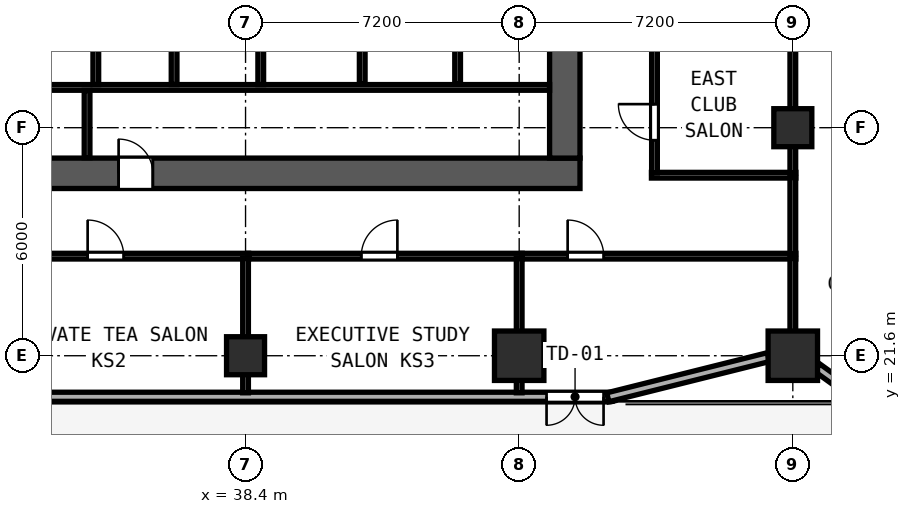
"""IFC4 building model, lengths in metres.
Left out: names, types, materials, properties, quantities, classifications, styles, units other than length and angle.
Written with IfcOpenShell. Run it as: python <this file> out.ifc"""

import sys

from ifc_helpers import new_model, si_unit, direction, frame, frame_2d, origin, origin_2d, place, context, subcontext, project, spatial, rectangle, hollow_rectangle, extrude, element, fill, save


model = new_model("IFC4")
c1 = context("Model", 3, precision=1e-05, world=origin(), true_north=direction((0.0, 1.0)))
c2 = subcontext(c1, "Body", "Model", "MODEL_VIEW")
j1 = project(units=[si_unit("LENGTHUNIT", "METRE"), si_unit("PLANEANGLEUNIT", "RADIAN")], contexts=[c1])
p1 = place(None, origin())
s1 = spatial("IfcSite", under=j1, at=p1, CompositionType="ELEMENT")
p2 = place(p1, origin())
s2 = spatial("IfcBuilding", under=s1, at=p2, CompositionType="ELEMENT")
p3 = place(p2, frame((0.0, 0.0, 24.0)))
s3 = spatial("IfcBuildingStorey", under=s2, at=p3, CompositionType="ELEMENT", Elevation=24.0)
p4 = place(p3, frame((29.6, 26.4, 0.0), z_axis=(0.0, 0.0, 1.0), x_axis=(1.0, 0.0, 0.0)))
e1 = element("IfcWall", 1, at=p4, inside=s3, PredefinedType="SHEAR", context=c2, shape_type="SweptSolid", body=[
    extrude(rectangle(XDim=17.6, YDim=0.8, at=frame_2d((8.8, 0.0))), origin(), (0.0, 0.0, 1.0), 3.6),
])
p5 = place(p4, frame((2.47, 0.0, 0.0), z_axis=(0.0, 0.0, 1.0), x_axis=(-1.0, 0.0, 0.0)))
e2 = element("IfcOpeningElement", 2, at=p5, cuts=e1, PredefinedType="OPENING", context=c2, shape_type="SweptSolid", body=[
    extrude(rectangle(XDim=0.9, YDim=2.1, at=frame_2d((0.45, 1.05))), frame((0.0, 0.41, 0.0), z_axis=(0.0, -1.0, 0.0), x_axis=(1.0, 0.0, 0.0)), (0.0, 0.0, 1.0), 0.82),
])
p6 = place(p4, frame((6.36, 0.0, 0.0), z_axis=(0.0, 0.0, 1.0), x_axis=(-1.0, 0.0, 0.0)))
e3 = element("IfcOpeningElement", 3, at=p6, cuts=e1, PredefinedType="OPENING", context=c2, shape_type="SweptSolid", body=[
    extrude(rectangle(XDim=0.9, YDim=2.1, at=frame_2d((0.45, 1.05))), frame((0.0, 0.41, 0.0), z_axis=(0.0, -1.0, 0.0), x_axis=(1.0, 0.0, 0.0)), (0.0, 0.0, 1.0), 0.82),
])
p7 = place(p3, frame((46.8, 26.8, 0.0), z_axis=(0.0, 0.0, 1.0), x_axis=(0.0, 1.0, 0.0)))
e4 = element("IfcWall", 4, at=p7, inside=s3, PredefinedType="SHEAR", context=c2, shape_type="SweptSolid", body=[
    extrude(rectangle(XDim=4.05, YDim=0.8, at=frame_2d((2.025, 0.0))), origin(), (0.0, 0.0, 1.0), 3.6),
])
for number, where, z_axis, x_axis in (
    (5, (52.8, 21.6, 0.0), (0.0, 0.0, 1.0), (1.0, 0.0, 0.0)),
    (6, (45.6, 21.6, 0.0), (0.0, 0.0, 1.0), (1.0, 0.0, 0.0)),
):
    element("IfcColumn", number, at=place(p3, frame(where, z_axis=z_axis, x_axis=x_axis)), inside=s3, PredefinedType="COLUMN", context=c2, shape_type="SweptSolid", body=[
        extrude(hollow_rectangle(XDim=1.3, YDim=1.3, WallThickness=0.048, at=origin_2d()), origin(), (0.0, 0.0, 1.0), 3.8),
    ])
for number, where, z_axis, x_axis in (
    (7, (52.8, 27.6, -0.26), (0.0, 0.0, 1.0), (1.0, 0.0, 0.0)),
    (8, (38.4, 21.6, -0.26), (0.0, 0.0, 1.0), (1.0, 0.0, 0.0)),
):
    element("IfcColumn", number, at=place(p3, frame(where, z_axis=z_axis, x_axis=x_axis)), inside=s3, PredefinedType="COLUMN", context=c2, shape_type="SweptSolid", body=[
        extrude(hollow_rectangle(XDim=1.0, YDim=1.0, WallThickness=0.038, at=origin_2d()), origin(), (0.0, 0.0, 1.0), 4.06),
    ])
p8 = place(p3, frame((28.76, 20.52, 0.0), z_axis=(0.0, 0.0, 1.0), x_axis=(1.0, 0.0, 0.0)))
e9 = element("IfcWall", 9, at=p8, inside=s3, PredefinedType="SOLIDWALL", context=c2, shape_type="SweptSolid", body=[
    extrude(rectangle(XDim=19.281, YDim=0.24, at=frame_2d((9.64, 0.0))), origin(), (0.0, 0.0, 1.0), 3.6),
])
p9 = place(p8, frame((19.06, 0.0, 0.0), z_axis=(0.0, 0.0, 1.0), x_axis=(-1.0, 0.0, 0.0)))
e10 = element("IfcOpeningElement", 10, at=p9, cuts=e9, PredefinedType="OPENING", context=c2, shape_type="SweptSolid", body=[
    extrude(rectangle(XDim=1.5, YDim=2.2, at=frame_2d((0.75, 1.1))), frame((0.0, 0.13, 0.0), z_axis=(0.0, -1.0, 0.0), x_axis=(1.0, 0.0, 0.0)), (0.0, 0.0, 1.0), 0.26),
])
p10 = place(p3, frame((47.932, 20.507, 0.0), z_axis=(0.0, 0.0, 1.0), x_axis=(0.970135906278, 0.242561998982, 0.0)))
e11 = element("IfcWall", 11, at=p10, inside=s3, PredefinedType="SOLIDWALL", context=c2, shape_type="SweptSolid", body=[
    extrude(rectangle(XDim=4.356, YDim=0.24, at=frame_2d((2.178, 0.0))), origin(), (0.0, 0.0, 1.0), 3.097),
])
p11 = place(p3, frame((53.442, 21.286, 0.0), z_axis=(0.0, 0.0, 1.0), x_axis=(0.811542842993, -0.584292917967, 0.0)))
e12 = element("IfcWall", 12, at=p11, inside=s3, PredefinedType="SOLIDWALL", context=c2, shape_type="SweptSolid", body=[
    extrude(rectangle(XDim=11.438, YDim=0.24, at=frame_2d((5.719, 0.0))), origin(), (0.0, 0.0, 1.0), 3.097),
])
p12 = place(p11, frame((1.6, 0.0, 0.85)))
e13 = element("IfcOpeningElement", 13, at=p12, cuts=e12, PredefinedType="OPENING", context=c2, shape_type="SweptSolid", body=[
    extrude(rectangle(XDim=1.2, YDim=1.85, at=frame_2d((0.6, 0.925))), frame((0.0, 0.13, 0.0), z_axis=(0.0, -1.0, 0.0), x_axis=(1.0, 0.0, 0.0)), (0.0, 0.0, 1.0), 0.26),
])
p13 = place(p11, frame((7.0, 0.0, 0.85)))
e14 = element("IfcOpeningElement", 14, at=p13, cuts=e12, PredefinedType="OPENING", context=c2, shape_type="SweptSolid", body=[
    extrude(rectangle(XDim=1.2, YDim=1.85, at=frame_2d((0.6, 0.925))), frame((0.0, 0.13, 0.0), z_axis=(0.0, -1.0, 0.0), x_axis=(1.0, 0.0, 0.0)), (0.0, 0.0, 1.0), 0.26),
])
p14 = place(p3, frame((30.4, 28.66, 0.0), z_axis=(0.0, 0.0, 1.0), x_axis=(1.0, 0.0, 0.0)))
e15 = element("IfcWall", 15, at=p14, inside=s3, PredefinedType="PARTITIONING", context=c2, shape_type="SweptSolid", body=[
    extrude(rectangle(XDim=16.0, YDim=0.15, at=frame_2d((8.0, 0.0))), origin(), (0.0, 0.0, 1.0), 3.6),
])
for number, where, z_axis, x_axis in (
    (16, (34.46, 28.735, 0.0), (0.0, 0.0, 1.0), (0.0, 1.0, 0.0)),
    (17, (36.52, 28.735, 0.0), (0.0, 0.0, 1.0), (0.0, 1.0, 0.0)),
    (18, (38.8, 28.735, 0.0), (0.0, 0.0, 1.0), (0.0, 1.0, 0.0)),
):
    element("IfcWall", number, at=place(p3, frame(where, z_axis=z_axis, x_axis=x_axis)), inside=s3, PredefinedType="SOLIDWALL", context=c2, shape_type="SweptSolid", body=[
        extrude(rectangle(XDim=1.985, YDim=0.15, at=frame_2d((0.992, 0.0))), origin(), (0.0, 0.0, 1.0), 3.6),
    ])
p15 = place(p3, frame((34.23, 26.81, 0.0), z_axis=(0.0, 0.0, 1.0), x_axis=(0.0, 1.0, 0.0)))
e19 = element("IfcWall", 19, at=p15, inside=s3, PredefinedType="PARTITIONING", context=c2, shape_type="SweptSolid", body=[
    extrude(rectangle(XDim=1.77, YDim=0.15, at=frame_2d((0.885, 0.0))), origin(), (0.0, 0.0, 1.0), 3.6),
])
for number, where, z_axis, x_axis in (
    (20, (41.47, 28.75, 0.0), (0.0, 0.0, 1.0), (0.0, 1.0, 0.0)),
    (21, (43.98, 28.75, 0.0), (0.0, 0.0, 1.0), (0.0, 1.0, 0.0)),
):
    element("IfcWall", number, at=place(p3, frame(where, z_axis=z_axis, x_axis=x_axis)), inside=s3, PredefinedType="SOLIDWALL", context=c2, shape_type="SweptSolid", body=[
        extrude(rectangle(XDim=1.985, YDim=0.15, at=frame_2d((0.993, 0.0))), origin(), (0.0, 0.0, 1.0), 3.6),
    ])
p16 = place(p3, frame((49.08, 26.35, 0.0), z_axis=(0.0, 0.0, 1.0), x_axis=(1.0, 0.0, 0.0)))
e22 = element("IfcWall", 22, at=p16, inside=s3, PredefinedType="PARTITIONING", context=c2, shape_type="SweptSolid", body=[
    extrude(rectangle(XDim=3.8, YDim=0.15, at=frame_2d((1.9, 0.0))), origin(), (0.0, 0.0, 1.0), 3.6),
])
p17 = place(p3, frame((49.16, 26.41, 0.0), z_axis=(0.0, 0.0, 1.0), x_axis=(0.0, 1.0, 0.0)))
e23 = element("IfcWall", 23, at=p17, inside=s3, PredefinedType="PARTITIONING", context=c2, shape_type="SweptSolid", body=[
    extrude(rectangle(XDim=3.51, YDim=0.15, at=frame_2d((1.755, 0.0))), origin(), (0.0, 0.0, 1.0), 3.6),
])
p18 = place(p17, frame((0.86, 0.0, 0.0)))
e24 = element("IfcOpeningElement", 24, at=p18, cuts=e23, PredefinedType="OPENING", context=c2, shape_type="SweptSolid", body=[
    extrude(rectangle(XDim=0.95, YDim=2.12, at=frame_2d((0.475, 1.06))), frame((0.0, 0.085, 0.0), z_axis=(0.0, -1.0, 0.0), x_axis=(1.0, 0.0, 0.0)), (0.0, 0.0, 1.0), 0.17),
])
p19 = place(p3, frame((52.8, 26.41, 0.0), z_axis=(0.0, 0.0, 1.0), x_axis=(0.0, 1.0, 0.0)))
e25 = element("IfcWall", 25, at=p19, inside=s3, PredefinedType="PARTITIONING", context=c2, shape_type="SweptSolid", body=[
    extrude(rectangle(XDim=3.51, YDim=0.15, at=frame_2d((1.755, 0.0))), origin(), (0.0, 0.0, 1.0), 3.097),
])
p20 = place(p3, frame((31.282, 24.22, 0.0), z_axis=(0.0, 0.0, 1.0), x_axis=(1.0, 0.0, 0.0)))
e26 = element("IfcWall", 26, at=p20, inside=s3, PredefinedType="PARTITIONING", context=c2, shape_type="SweptSolid", body=[
    extrude(rectangle(XDim=7.198, YDim=0.15, at=frame_2d((3.599, 0.0))), origin(), (0.0, 0.0, 1.0), 3.6),
])
p21 = place(p20, frame((3.913, 0.0, 0.0), z_axis=(0.0, 0.0, 1.0), x_axis=(-1.0, 0.0, 0.0)))
e27 = element("IfcOpeningElement", 27, at=p21, cuts=e26, PredefinedType="OPENING", context=c2, shape_type="SweptSolid", body=[
    extrude(rectangle(XDim=0.95, YDim=2.12, at=frame_2d((0.475, 1.06))), frame((0.0, 0.085, 0.0), z_axis=(0.0, -1.0, 0.0), x_axis=(1.0, 0.0, 0.0)), (0.0, 0.0, 1.0), 0.17),
])
p22 = place(p3, frame((38.4, 20.625, 0.0), z_axis=(0.0, 0.0, 1.0), x_axis=(0.0, 1.0, 0.0)))
e28 = element("IfcWall", 28, at=p22, inside=s3, PredefinedType="PARTITIONING", context=c2, shape_type="SweptSolid", body=[
    extrude(rectangle(XDim=3.535, YDim=0.15, at=frame_2d((1.768, 0.0))), origin(), (0.0, 0.0, 1.0), 2.985),
])
p23 = place(p3, frame((38.482, 24.22, 0.0), z_axis=(0.0, 0.0, 1.0), x_axis=(1.0, 0.0, 0.0)))
e29 = element("IfcWall", 29, at=p23, inside=s3, PredefinedType="PARTITIONING", context=c2, shape_type="SweptSolid", body=[
    extrude(rectangle(XDim=7.198, YDim=0.15, at=frame_2d((3.599, 0.0))), origin(), (0.0, 0.0, 1.0), 3.6),
])
p24 = place(p23, frame((3.913, 0.0, 0.0), z_axis=(0.0, 0.0, 1.0), x_axis=(-1.0, 0.0, 0.0)))
e30 = element("IfcOpeningElement", 30, at=p24, cuts=e29, PredefinedType="OPENING", context=c2, shape_type="SweptSolid", body=[
    extrude(rectangle(XDim=0.95, YDim=2.12, at=frame_2d((0.475, 1.06))), frame((0.0, 0.085, 0.0), z_axis=(0.0, -1.0, 0.0), x_axis=(1.0, 0.0, 0.0)), (0.0, 0.0, 1.0), 0.17),
])
p25 = place(p3, frame((45.6, 20.625, 0.0), z_axis=(0.0, 0.0, 1.0), x_axis=(0.0, 1.0, 0.0)))
e31 = element("IfcWall", 31, at=p25, inside=s3, PredefinedType="PARTITIONING", context=c2, shape_type="SweptSolid", body=[
    extrude(rectangle(XDim=3.535, YDim=0.15, at=frame_2d((1.768, 0.0))), origin(), (0.0, 0.0, 1.0), 2.985),
])
p26 = place(p3, frame((45.682, 24.22, 0.0), z_axis=(0.0, 0.0, 1.0), x_axis=(1.0, 0.0, 0.0)))
e32 = element("IfcWall", 32, at=p26, inside=s3, PredefinedType="PARTITIONING", context=c2, shape_type="SweptSolid", body=[
    extrude(rectangle(XDim=7.198, YDim=0.15, at=frame_2d((3.599, 0.0))), origin(), (0.0, 0.0, 1.0), 3.6),
])
p27 = place(p26, frame((2.143, 0.0, 0.0), z_axis=(0.0, 0.0, 1.0), x_axis=(-1.0, 0.0, 0.0)))
e33 = element("IfcOpeningElement", 33, at=p27, cuts=e32, PredefinedType="OPENING", context=c2, shape_type="SweptSolid", body=[
    extrude(rectangle(XDim=0.95, YDim=2.12, at=frame_2d((0.475, 1.06))), frame((0.0, 0.085, 0.0), z_axis=(0.0, -1.0, 0.0), x_axis=(1.0, 0.0, 0.0)), (0.0, 0.0, 1.0), 0.17),
])
p28 = place(p3, frame((52.8, 21.819, 0.0), z_axis=(0.0, 0.0, 1.0), x_axis=(0.0, 1.0, 0.0)))
e34 = element("IfcWall", 34, at=p28, inside=s3, PredefinedType="PARTITIONING", context=c2, shape_type="SweptSolid", body=[
    extrude(rectangle(XDim=2.341, YDim=0.15, at=frame_2d((1.171, 0.0))), origin(), (0.0, 0.0, 1.0), 3.097),
])
p29 = place(p3, frame((52.8, 24.28, 0.0), z_axis=(0.0, 0.0, 1.0), x_axis=(0.0, 1.0, 0.0)))
e35 = element("IfcWall", 35, at=p29, inside=s3, PredefinedType="PARTITIONING", context=c2, shape_type="SweptSolid", body=[
    extrude(rectangle(XDim=2.01, YDim=0.15, at=frame_2d((1.005, 0.0))), origin(), (0.0, 0.0, 1.0), 3.097),
])
p30 = place(p9, origin())
e36 = element("IfcDoor", 36, at=p30, inside=s3, OperationType="DOUBLE_DOOR_SINGLE_SWING", PredefinedType="DOOR", context=c2, shape_type="SweptSolid", body=[
    extrude(rectangle(XDim=1.5, YDim=2.2, at=frame_2d((0.75, 1.1))), frame((0.0, 0.025, 0.0), z_axis=(0.0, -1.0, 0.0), x_axis=(1.0, 0.0, 0.0)), (0.0, 0.0, 1.0), 0.05),
])
fill(e10, e36)
p31 = place(p6, origin())
e37 = element("IfcDoor", 37, at=p31, inside=s3, OperationType="SINGLE_SWING_RIGHT", PredefinedType="DOOR", context=c2, shape_type="SweptSolid", body=[
    extrude(rectangle(XDim=0.9, YDim=2.1, at=frame_2d((0.45, 1.05))), frame((0.0, -0.195, 0.0), z_axis=(0.0, -1.0, 0.0), x_axis=(1.0, 0.0, 0.0)), (0.0, 0.0, 1.0), 0.05),
])
fill(e3, e37)
p32 = place(p18, origin())
e38 = element("IfcDoor", 38, at=p32, inside=s3, OperationType="SINGLE_SWING_RIGHT", PredefinedType="DOOR", context=c2, shape_type="SweptSolid", body=[
    extrude(rectangle(XDim=0.95, YDim=2.12, at=frame_2d((0.475, 1.06))), frame((0.0, 0.025, 0.0), z_axis=(0.0, -1.0, 0.0), x_axis=(1.0, 0.0, 0.0)), (0.0, 0.0, 1.0), 0.05),
])
fill(e24, e38)
p33 = place(p21, origin())
e39 = element("IfcDoor", 39, at=p33, inside=s3, OperationType="SINGLE_SWING_RIGHT", PredefinedType="DOOR", context=c2, shape_type="SweptSolid", body=[
    extrude(rectangle(XDim=0.95, YDim=2.12, at=frame_2d((0.475, 1.06))), frame((0.0, 0.025, 0.0), z_axis=(0.0, -1.0, 0.0), x_axis=(1.0, 0.0, 0.0)), (0.0, 0.0, 1.0), 0.05),
])
fill(e27, e39)
p34 = place(p24, origin())
e40 = element("IfcDoor", 40, at=p34, inside=s3, OperationType="SINGLE_SWING_LEFT", PredefinedType="DOOR", context=c2, shape_type="SweptSolid", body=[
    extrude(rectangle(XDim=0.95, YDim=2.12, at=frame_2d((0.475, 1.06))), frame((0.0, 0.025, 0.0), z_axis=(0.0, -1.0, 0.0), x_axis=(1.0, 0.0, 0.0)), (0.0, 0.0, 1.0), 0.05),
])
fill(e30, e40)
p35 = place(p27, origin())
e41 = element("IfcDoor", 41, at=p35, inside=s3, OperationType="SINGLE_SWING_RIGHT", PredefinedType="DOOR", context=c2, shape_type="SweptSolid", body=[
    extrude(rectangle(XDim=0.95, YDim=2.12, at=frame_2d((0.475, 1.06))), frame((0.0, 0.025, 0.0), z_axis=(0.0, -1.0, 0.0), x_axis=(1.0, 0.0, 0.0)), (0.0, 0.0, 1.0), 0.05),
])
fill(e33, e41)
save(model, sys.argv[1])
